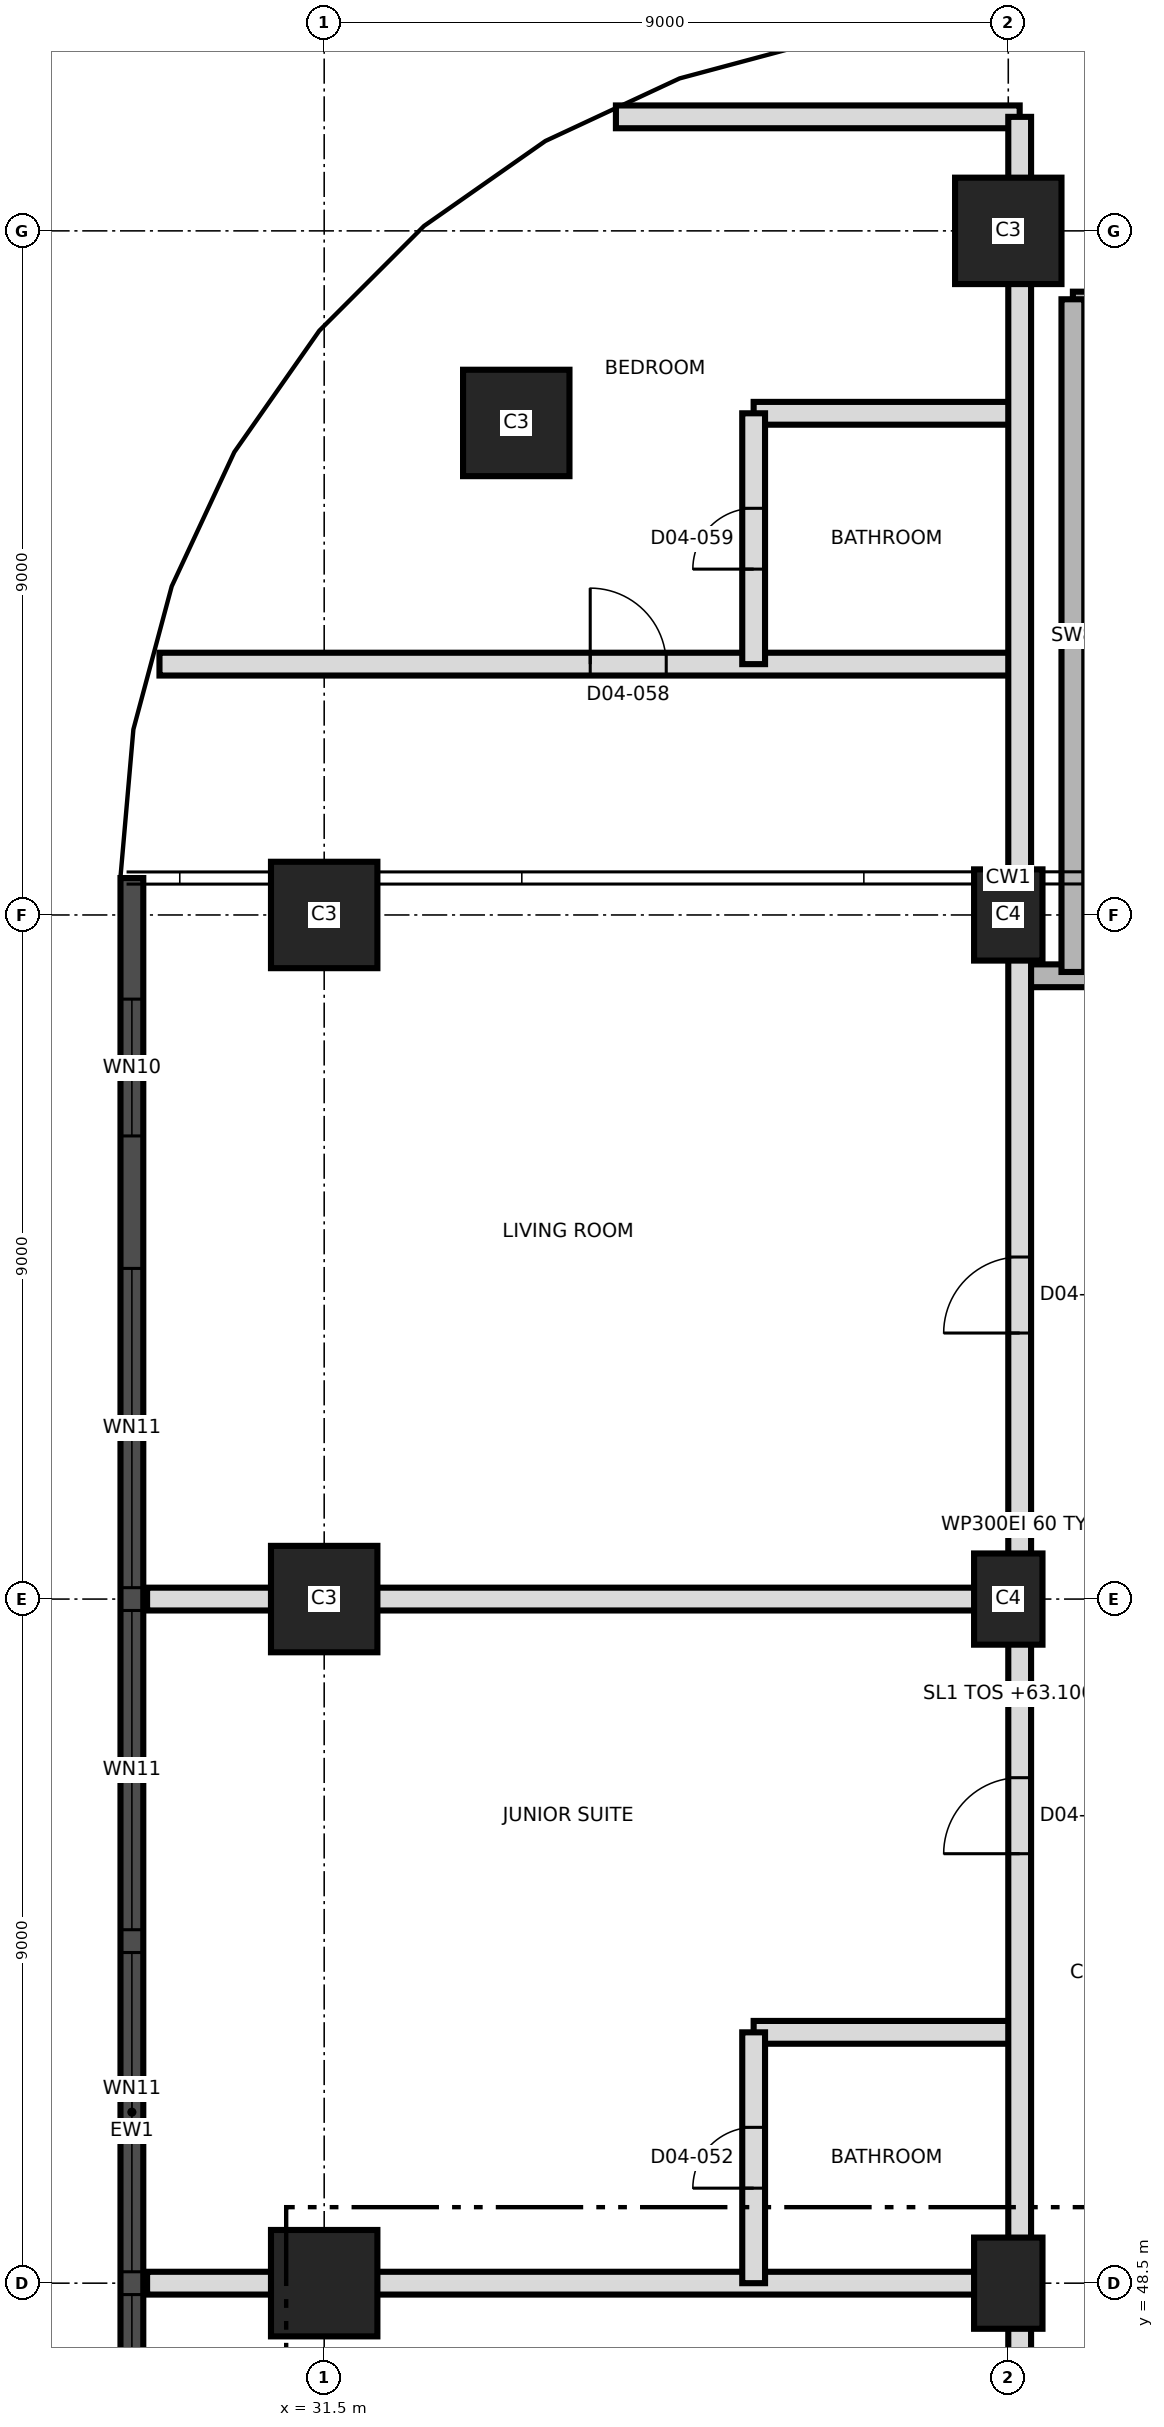
"""IFC4 building model, lengths in metres.
Left out: names, types, materials, properties, quantities, classifications, styles, units other than length and angle.
Written with IfcOpenShell. Run it as: python <this file> out.ifc"""

import sys

from ifc_helpers import new_model, si_unit, direction, frame, frame_2d, origin, origin_2d, place, context, subcontext, project, spatial, rectangle, extrude, element, fill, save


model = new_model("IFC4")
c1 = context("Model", 3, precision=1e-05, world=origin(), true_north=direction((0.0, 1.0)))
c2 = subcontext(c1, "Body", "Model", "MODEL_VIEW")
j1 = project(units=[si_unit("LENGTHUNIT", "METRE"), si_unit("PLANEANGLEUNIT", "RADIAN")], contexts=[c1])
p1 = place(None, origin())
s1 = spatial("IfcSite", under=j1, at=p1, CompositionType="ELEMENT")
p2 = place(p1, origin())
s2 = spatial("IfcBuilding", under=s1, at=p2, CompositionType="ELEMENT")
p3 = place(p2, frame((0.0, 0.0, 63.1)))
s3 = spatial("IfcBuildingStorey", under=s2, at=p3, CompositionType="ELEMENT", Elevation=63.1)
p4 = place(p3, frame((31.5, 48.5, 0.0), z_axis=(0.0, 0.0, 1.0), x_axis=(1.0, 0.0, 0.0)))
e1 = element("IfcColumn", 1, at=p4, inside=s3, PredefinedType="COLUMN", context=c2, shape_type="SweptSolid", body=[
    extrude(rectangle(XDim=1.4, YDim=1.4, at=origin_2d()), origin(), (0.0, 0.0, 1.0), 3.7),
])
p5 = place(p3, frame((40.5, 48.5, 0.0), z_axis=(0.0, 0.0, 1.0), x_axis=(0.0, 1.0, 0.0)))
e2 = element("IfcColumn", 2, at=p5, inside=s3, PredefinedType="COLUMN", context=c2, shape_type="SweptSolid", body=[
    extrude(rectangle(XDim=1.2, YDim=0.9, at=origin_2d()), origin(), (0.0, 0.0, 1.0), 3.7),
])
p6 = place(p3, frame((31.5, 57.5, 0.0), z_axis=(0.0, 0.0, 1.0), x_axis=(1.0, 0.0, 0.0)))
e3 = element("IfcColumn", 3, at=p6, inside=s3, PredefinedType="COLUMN", context=c2, shape_type="SweptSolid", body=[
    extrude(rectangle(XDim=1.4, YDim=1.4, at=origin_2d()), origin(), (0.0, 0.0, 1.0), 3.7),
])
p7 = place(p3, frame((40.5, 57.5, 0.0), z_axis=(0.0, 0.0, 1.0), x_axis=(0.0, 1.0, 0.0)))
e4 = element("IfcColumn", 4, at=p7, inside=s3, PredefinedType="COLUMN", context=c2, shape_type="SweptSolid", body=[
    extrude(rectangle(XDim=1.2, YDim=0.9, at=origin_2d()), origin(), (0.0, 0.0, 1.0), 3.7),
])
p8 = place(p3, frame((31.5, 66.5, 0.0), z_axis=(0.0, 0.0, 1.0), x_axis=(1.0, 0.0, 0.0)))
e5 = element("IfcColumn", 5, at=p8, inside=s3, PredefinedType="COLUMN", context=c2, shape_type="SweptSolid", body=[
    extrude(rectangle(XDim=1.4, YDim=1.4, at=origin_2d()), origin(), (0.0, 0.0, 1.0), 3.7),
])
p9 = place(p3, frame((40.5, 66.5, 0.0), z_axis=(0.0, 0.0, 1.0), x_axis=(0.0, 1.0, 0.0)))
e6 = element("IfcColumn", 6, at=p9, inside=s3, PredefinedType="COLUMN", context=c2, shape_type="SweptSolid", body=[
    extrude(rectangle(XDim=1.2, YDim=0.9, at=origin_2d()), origin(), (0.0, 0.0, 1.0), 3.7),
])
for number, where, z_axis, x_axis in (
    (7, (34.027, 72.973, 0.0), (0.0, 0.0, 1.0), (1.0, 0.0, 0.0)),
    (8, (40.5, 75.5, 0.0), (0.0, 0.0, 1.0), (1.0, 0.0, 0.0)),
):
    element("IfcColumn", number, at=place(p3, frame(where, z_axis=z_axis, x_axis=x_axis)), inside=s3, PredefinedType="COLUMN", context=c2, shape_type="SweptSolid", body=[
        extrude(rectangle(XDim=1.4, YDim=1.4, at=origin_2d()), origin(), (0.0, 0.0, 1.0), 3.7),
    ])
p10 = place(p3, frame((28.97, 66.986, 0.0), z_axis=(0.0, 0.0, 1.0), x_axis=(0.0, -1.0, 0.0)))
e9 = element("IfcWall", 9, at=p10, inside=s3, PredefinedType="SOLIDWALL", context=c2, shape_type="SweptSolid", body=[
    extrude(rectangle(XDim=32.976, YDim=0.3, at=frame_2d((16.488, 0.0))), origin(), (0.0, 0.0, 1.0), 3.4),
])
p11 = place(p10, frame((1.593, 0.0, 0.3)))
e10 = element("IfcOpeningElement", 10, at=p11, cuts=e9, PredefinedType="OPENING", context=c2, shape_type="SweptSolid", body=[
    extrude(rectangle(XDim=1.8, YDim=2.4, at=frame_2d((0.9, 1.2))), frame((0.0, 0.16, 0.0), z_axis=(0.0, -1.0, 0.0), x_axis=(1.0, 0.0, 0.0)), (0.0, 0.0, 1.0), 0.32),
])
p12 = place(p10, frame((5.136, 0.0, 0.9)))
e11 = element("IfcOpeningElement", 11, at=p12, cuts=e9, PredefinedType="OPENING", context=c2, shape_type="SweptSolid", body=[
    extrude(rectangle(XDim=4.2, YDim=1.5, at=frame_2d((2.1, 0.75))), frame((0.0, 0.16, 0.0), z_axis=(0.0, -1.0, 0.0), x_axis=(1.0, 0.0, 0.0)), (0.0, 0.0, 1.0), 0.32),
])
p13 = place(p10, frame((9.636, 0.0, 0.9)))
e12 = element("IfcOpeningElement", 12, at=p13, cuts=e9, PredefinedType="OPENING", context=c2, shape_type="SweptSolid", body=[
    extrude(rectangle(XDim=4.2, YDim=1.5, at=frame_2d((2.1, 0.75))), frame((0.0, 0.16, 0.0), z_axis=(0.0, -1.0, 0.0), x_axis=(1.0, 0.0, 0.0)), (0.0, 0.0, 1.0), 0.32),
])
p14 = place(p10, frame((14.136, 0.0, 0.9)))
e13 = element("IfcOpeningElement", 13, at=p14, cuts=e9, PredefinedType="OPENING", context=c2, shape_type="SweptSolid", body=[
    extrude(rectangle(XDim=4.2, YDim=1.5, at=frame_2d((2.1, 0.75))), frame((0.0, 0.16, 0.0), z_axis=(0.0, -1.0, 0.0), x_axis=(1.0, 0.0, 0.0)), (0.0, 0.0, 1.0), 0.32),
])
p15 = place(p10, frame((18.636, 0.0, 0.9)))
e14 = element("IfcOpeningElement", 14, at=p15, cuts=e9, PredefinedType="OPENING", context=c2, shape_type="SweptSolid", body=[
    extrude(rectangle(XDim=4.2, YDim=1.5, at=frame_2d((2.1, 0.75))), frame((0.0, 0.16, 0.0), z_axis=(0.0, -1.0, 0.0), x_axis=(1.0, 0.0, 0.0)), (0.0, 0.0, 1.0), 0.32),
])
p16 = place(p10, frame((23.136, 0.0, 0.9)))
e15 = element("IfcOpeningElement", 15, at=p16, cuts=e9, PredefinedType="OPENING", context=c2, shape_type="SweptSolid", body=[
    extrude(rectangle(XDim=4.2, YDim=1.5, at=frame_2d((2.1, 0.75))), frame((0.0, 0.16, 0.0), z_axis=(0.0, -1.0, 0.0), x_axis=(1.0, 0.0, 0.0)), (0.0, 0.0, 1.0), 0.32),
])
p17 = place(p10, frame((29.331, 0.0, 0.3)))
e16 = element("IfcOpeningElement", 16, at=p17, cuts=e9, PredefinedType="OPENING", context=c2, shape_type="SweptSolid", body=[
    extrude(rectangle(XDim=1.8, YDim=2.4, at=frame_2d((0.9, 1.2))), frame((0.0, 0.16, 0.0), z_axis=(0.0, -1.0, 0.0), x_axis=(1.0, 0.0, 0.0)), (0.0, 0.0, 1.0), 0.32),
])
p18 = place(p3, frame((29.17, 48.5, 0.0), z_axis=(0.0, 0.0, 1.0), x_axis=(1.0, 0.0, 0.0)))
e17 = element("IfcWall", 17, at=p18, inside=s3, PredefinedType="PARTITIONING", context=c2, shape_type="SweptSolid", body=[
    extrude(rectangle(XDim=11.48, YDim=0.3, at=frame_2d((5.74, 0.0))), origin(), (0.0, 0.0, 1.0), 3.4),
])
p19 = place(p3, frame((37.15, 51.8, 0.0), z_axis=(0.0, 0.0, 1.0), x_axis=(1.0, 0.0, 0.0)))
e18 = element("IfcWall", 18, at=p19, inside=s3, PredefinedType="PARTITIONING", context=c2, shape_type="SweptSolid", body=[
    extrude(rectangle(XDim=3.5, YDim=0.3, at=frame_2d((1.75, 0.0))), origin(), (0.0, 0.0, 1.0), 3.4),
])
p20 = place(p3, frame((29.17, 57.5, 0.0), z_axis=(0.0, 0.0, 1.0), x_axis=(1.0, 0.0, 0.0)))
e19 = element("IfcWall", 19, at=p20, inside=s3, PredefinedType="PARTITIONING", context=c2, shape_type="SweptSolid", body=[
    extrude(rectangle(XDim=11.48, YDim=0.3, at=frame_2d((5.74, 0.0))), origin(), (0.0, 0.0, 1.0), 3.4),
])
p21 = place(p3, frame((40.65, 65.7, 0.0), z_axis=(0.0, 0.0, 1.0), x_axis=(1.0, 0.0, 0.0)))
e20 = element("IfcWall", 20, at=p21, inside=s3, PredefinedType="SHEAR", context=c2, shape_type="SweptSolid", body=[
    extrude(rectangle(XDim=6.2, YDim=0.3, at=frame_2d((3.1, 0.0))), origin(), (0.0, 0.0, 1.0), 3.4),
])
p22 = place(p21, frame((1.1, 0.0, 0.0)))
e21 = element("IfcOpeningElement", 21, at=p22, cuts=e20, PredefinedType="OPENING", context=c2, shape_type="SweptSolid", body=[
    extrude(rectangle(XDim=1.2, YDim=2.1, at=frame_2d((0.6, 1.05))), frame((0.0, 0.16, 0.0), z_axis=(0.0, -1.0, 0.0), x_axis=(1.0, 0.0, 0.0)), (0.0, 0.0, 1.0), 0.32),
])
p23 = place(p3, frame((29.333, 69.8, 0.0), z_axis=(0.0, 0.0, 1.0), x_axis=(1.0, 0.0, 0.0)))
e22 = element("IfcWall", 22, at=p23, inside=s3, PredefinedType="PARTITIONING", context=c2, shape_type="SweptSolid", body=[
    extrude(rectangle(XDim=11.317, YDim=0.3, at=frame_2d((5.658, 0.0))), origin(), (0.0, 0.0, 1.0), 3.4),
])
p24 = place(p23, frame((5.667, 0.0, 0.0)))
e23 = element("IfcOpeningElement", 23, at=p24, cuts=e22, PredefinedType="OPENING", context=c2, shape_type="SweptSolid", body=[
    extrude(rectangle(XDim=1.0, YDim=2.1, at=frame_2d((0.5, 1.05))), frame((0.0, 0.16, 0.0), z_axis=(0.0, -1.0, 0.0), x_axis=(1.0, 0.0, 0.0)), (0.0, 0.0, 1.0), 0.32),
])
p25 = place(p3, frame((37.15, 73.1, 0.0), z_axis=(0.0, 0.0, 1.0), x_axis=(1.0, 0.0, 0.0)))
e24 = element("IfcWall", 24, at=p25, inside=s3, PredefinedType="PARTITIONING", context=c2, shape_type="SweptSolid", body=[
    extrude(rectangle(XDim=3.5, YDim=0.3, at=frame_2d((1.75, 0.0))), origin(), (0.0, 0.0, 1.0), 3.4),
])
p26 = place(p3, frame((41.35, 74.55, 0.0), z_axis=(0.0, 0.0, 1.0), x_axis=(1.0, 0.0, 0.0)))
e25 = element("IfcWall", 25, at=p26, inside=s3, PredefinedType="SHEAR", context=c2, shape_type="SweptSolid", body=[
    extrude(rectangle(XDim=3.0, YDim=0.3, at=frame_2d((1.5, 0.0))), origin(), (0.0, 0.0, 1.0), 3.4),
])
p27 = place(p3, frame((35.338, 77.0, 0.0), z_axis=(0.0, 0.0, 1.0), x_axis=(1.0, 0.0, 0.0)))
e26 = element("IfcWall", 26, at=p27, inside=s3, PredefinedType="PARTITIONING", context=c2, shape_type="SweptSolid", body=[
    extrude(rectangle(XDim=5.312, YDim=0.3, at=frame_2d((2.656, 0.0))), origin(), (0.0, 0.0, 1.0), 3.4),
])
p28 = place(p3, frame((37.15, 48.5, 0.0), z_axis=(0.0, 0.0, 1.0), x_axis=(0.0, 1.0, 0.0)))
e27 = element("IfcWall", 27, at=p28, inside=s3, PredefinedType="PARTITIONING", context=c2, shape_type="SweptSolid", body=[
    extrude(rectangle(XDim=3.3, YDim=0.3, at=frame_2d((1.65, 0.0))), origin(), (0.0, 0.0, 1.0), 3.4),
])
p29 = place(p28, frame((1.25, 0.0, 0.0)))
e28 = element("IfcOpeningElement", 28, at=p29, cuts=e27, PredefinedType="OPENING", context=c2, shape_type="SweptSolid", body=[
    extrude(rectangle(XDim=0.8, YDim=2.1, at=frame_2d((0.4, 1.05))), frame((0.0, 0.16, 0.0), z_axis=(0.0, -1.0, 0.0), x_axis=(1.0, 0.0, 0.0)), (0.0, 0.0, 1.0), 0.32),
])
p30 = place(p3, frame((37.15, 69.8, 0.0), z_axis=(0.0, 0.0, 1.0), x_axis=(0.0, 1.0, 0.0)))
e29 = element("IfcWall", 29, at=p30, inside=s3, PredefinedType="PARTITIONING", context=c2, shape_type="SweptSolid", body=[
    extrude(rectangle(XDim=3.3, YDim=0.3, at=frame_2d((1.65, 0.0))), origin(), (0.0, 0.0, 1.0), 3.4),
])
p31 = place(p30, frame((1.25, 0.0, 0.0)))
e30 = element("IfcOpeningElement", 30, at=p31, cuts=e29, PredefinedType="OPENING", context=c2, shape_type="SweptSolid", body=[
    extrude(rectangle(XDim=0.8, YDim=2.1, at=frame_2d((0.4, 1.05))), frame((0.0, 0.16, 0.0), z_axis=(0.0, -1.0, 0.0), x_axis=(1.0, 0.0, 0.0)), (0.0, 0.0, 1.0), 0.32),
])
p32 = place(p3, frame((40.65, 39.95, 0.0), z_axis=(0.0, 0.0, 1.0), x_axis=(0.0, 1.0, 0.0)))
e31 = element("IfcWall", 31, at=p32, inside=s3, PredefinedType="PARTITIONING", context=c2, shape_type="SweptSolid", body=[
    extrude(rectangle(XDim=37.05, YDim=0.3, at=frame_2d((18.525, 0.0))), origin(), (0.0, 0.0, 1.0), 3.4),
])
p33 = place(p32, frame((0.58, 0.0, 0.0)))
e32 = element("IfcOpeningElement", 32, at=p33, cuts=e31, PredefinedType="OPENING", context=c2, shape_type="SweptSolid", body=[
    extrude(rectangle(XDim=1.0, YDim=2.1, at=frame_2d((0.5, 1.05))), frame((0.0, 0.16, 0.0), z_axis=(0.0, -1.0, 0.0), x_axis=(1.0, 0.0, 0.0)), (0.0, 0.0, 1.0), 0.32),
])
p34 = place(p32, frame((6.43, 0.0, 0.0)))
e33 = element("IfcOpeningElement", 33, at=p34, cuts=e31, PredefinedType="OPENING", context=c2, shape_type="SweptSolid", body=[
    extrude(rectangle(XDim=1.0, YDim=2.1, at=frame_2d((0.5, 1.05))), frame((0.0, 0.16, 0.0), z_axis=(0.0, -1.0, 0.0), x_axis=(1.0, 0.0, 0.0)), (0.0, 0.0, 1.0), 0.32),
])
p35 = place(p32, frame((14.2, 0.0, 0.0)))
e34 = element("IfcOpeningElement", 34, at=p35, cuts=e31, PredefinedType="OPENING", context=c2, shape_type="SweptSolid", body=[
    extrude(rectangle(XDim=1.0, YDim=2.4, at=frame_2d((0.5, 1.2))), frame((0.0, 0.16, 0.0), z_axis=(0.0, -1.0, 0.0), x_axis=(1.0, 0.0, 0.0)), (0.0, 0.0, 1.0), 0.32),
])
p36 = place(p32, frame((21.05, 0.0, 0.0)))
e35 = element("IfcOpeningElement", 35, at=p36, cuts=e31, PredefinedType="OPENING", context=c2, shape_type="SweptSolid", body=[
    extrude(rectangle(XDim=1.0, YDim=2.4, at=frame_2d((0.5, 1.2))), frame((0.0, 0.16, 0.0), z_axis=(0.0, -1.0, 0.0), x_axis=(1.0, 0.0, 0.0)), (0.0, 0.0, 1.0), 0.32),
])
p37 = place(p3, frame((41.35, 65.75, 0.0), z_axis=(0.0, 0.0, 1.0), x_axis=(0.0, 1.0, 0.0)))
e36 = element("IfcWall", 36, at=p37, inside=s3, PredefinedType="SHEAR", context=c2, shape_type="SweptSolid", body=[
    extrude(rectangle(XDim=8.85, YDim=0.3, at=frame_2d((4.425, 0.0))), origin(), (0.0, 0.0, 1.0), 3.4),
])
p38 = place(p11, origin())
e37 = element("IfcWindow", 37, at=p38, inside=s3, PartitioningType="SINGLE_PANEL", PredefinedType="WINDOW", context=c2, shape_type="SweptSolid", body=[
    extrude(rectangle(XDim=1.8, YDim=2.4, at=frame_2d((0.9, 1.2))), frame((0.0, 0.03, 0.0), z_axis=(0.0, -1.0, 0.0), x_axis=(1.0, 0.0, 0.0)), (0.0, 0.0, 1.0), 0.06),
])
fill(e10, e37)
p39 = place(p12, origin())
e38 = element("IfcWindow", 38, at=p39, inside=s3, PartitioningType="SINGLE_PANEL", PredefinedType="WINDOW", context=c2, shape_type="SweptSolid", body=[
    extrude(rectangle(XDim=4.2, YDim=1.5, at=frame_2d((2.1, 0.75))), frame((0.0, 0.03, 0.0), z_axis=(0.0, -1.0, 0.0), x_axis=(1.0, 0.0, 0.0)), (0.0, 0.0, 1.0), 0.06),
])
fill(e11, e38)
p40 = place(p13, origin())
e39 = element("IfcWindow", 39, at=p40, inside=s3, PartitioningType="SINGLE_PANEL", PredefinedType="WINDOW", context=c2, shape_type="SweptSolid", body=[
    extrude(rectangle(XDim=4.2, YDim=1.5, at=frame_2d((2.1, 0.75))), frame((0.0, 0.03, 0.0), z_axis=(0.0, -1.0, 0.0), x_axis=(1.0, 0.0, 0.0)), (0.0, 0.0, 1.0), 0.06),
])
fill(e12, e39)
p41 = place(p14, origin())
e40 = element("IfcWindow", 40, at=p41, inside=s3, PartitioningType="SINGLE_PANEL", PredefinedType="WINDOW", context=c2, shape_type="SweptSolid", body=[
    extrude(rectangle(XDim=4.2, YDim=1.5, at=frame_2d((2.1, 0.75))), frame((0.0, 0.03, 0.0), z_axis=(0.0, -1.0, 0.0), x_axis=(1.0, 0.0, 0.0)), (0.0, 0.0, 1.0), 0.06),
])
fill(e13, e40)
p42 = place(p15, origin())
e41 = element("IfcWindow", 41, at=p42, inside=s3, PartitioningType="SINGLE_PANEL", PredefinedType="WINDOW", context=c2, shape_type="SweptSolid", body=[
    extrude(rectangle(XDim=4.2, YDim=1.5, at=frame_2d((2.1, 0.75))), frame((0.0, 0.03, 0.0), z_axis=(0.0, -1.0, 0.0), x_axis=(1.0, 0.0, 0.0)), (0.0, 0.0, 1.0), 0.06),
])
fill(e14, e41)
p43 = place(p29, origin())
e42 = element("IfcDoor", 42, at=p43, inside=s3, OperationType="SINGLE_SWING_LEFT", PredefinedType="DOOR", context=c2, shape_type="SweptSolid", body=[
    extrude(rectangle(XDim=0.8, YDim=2.1, at=frame_2d((0.4, 1.05))), frame((0.0, 0.025, 0.0), z_axis=(0.0, -1.0, 0.0), x_axis=(1.0, 0.0, 0.0)), (0.0, 0.0, 1.0), 0.05),
])
fill(e28, e42)
p44 = place(p35, origin())
e43 = element("IfcDoor", 43, at=p44, inside=s3, OperationType="SINGLE_SWING_RIGHT", PredefinedType="DOOR", context=c2, shape_type="SweptSolid", body=[
    extrude(rectangle(XDim=1.0, YDim=2.4, at=frame_2d((0.5, 1.2))), frame((0.0, 0.025, 0.0), z_axis=(0.0, -1.0, 0.0), x_axis=(1.0, 0.0, 0.0)), (0.0, 0.0, 1.0), 0.05),
])
fill(e34, e43)
p45 = place(p36, origin())
e44 = element("IfcDoor", 44, at=p45, inside=s3, OperationType="SINGLE_SWING_LEFT", PredefinedType="DOOR", context=c2, shape_type="SweptSolid", body=[
    extrude(rectangle(XDim=1.0, YDim=2.4, at=frame_2d((0.5, 1.2))), frame((0.0, 0.025, 0.0), z_axis=(0.0, -1.0, 0.0), x_axis=(1.0, 0.0, 0.0)), (0.0, 0.0, 1.0), 0.05),
])
fill(e35, e44)
p46 = place(p24, origin())
e45 = element("IfcDoor", 45, at=p46, inside=s3, OperationType="SINGLE_SWING_RIGHT", PredefinedType="DOOR", context=c2, shape_type="SweptSolid", body=[
    extrude(rectangle(XDim=1.0, YDim=2.1, at=frame_2d((0.5, 1.05))), frame((0.0, 0.025, 0.0), z_axis=(0.0, -1.0, 0.0), x_axis=(1.0, 0.0, 0.0)), (0.0, 0.0, 1.0), 0.05),
])
fill(e23, e45)
p47 = place(p31, origin())
e46 = element("IfcDoor", 46, at=p47, inside=s3, OperationType="SINGLE_SWING_LEFT", PredefinedType="DOOR", context=c2, shape_type="SweptSolid", body=[
    extrude(rectangle(XDim=0.8, YDim=2.1, at=frame_2d((0.4, 1.05))), frame((0.0, 0.025, 0.0), z_axis=(0.0, -1.0, 0.0), x_axis=(1.0, 0.0, 0.0)), (0.0, 0.0, 1.0), 0.05),
])
fill(e30, e46)
save(model, sys.argv[1])
